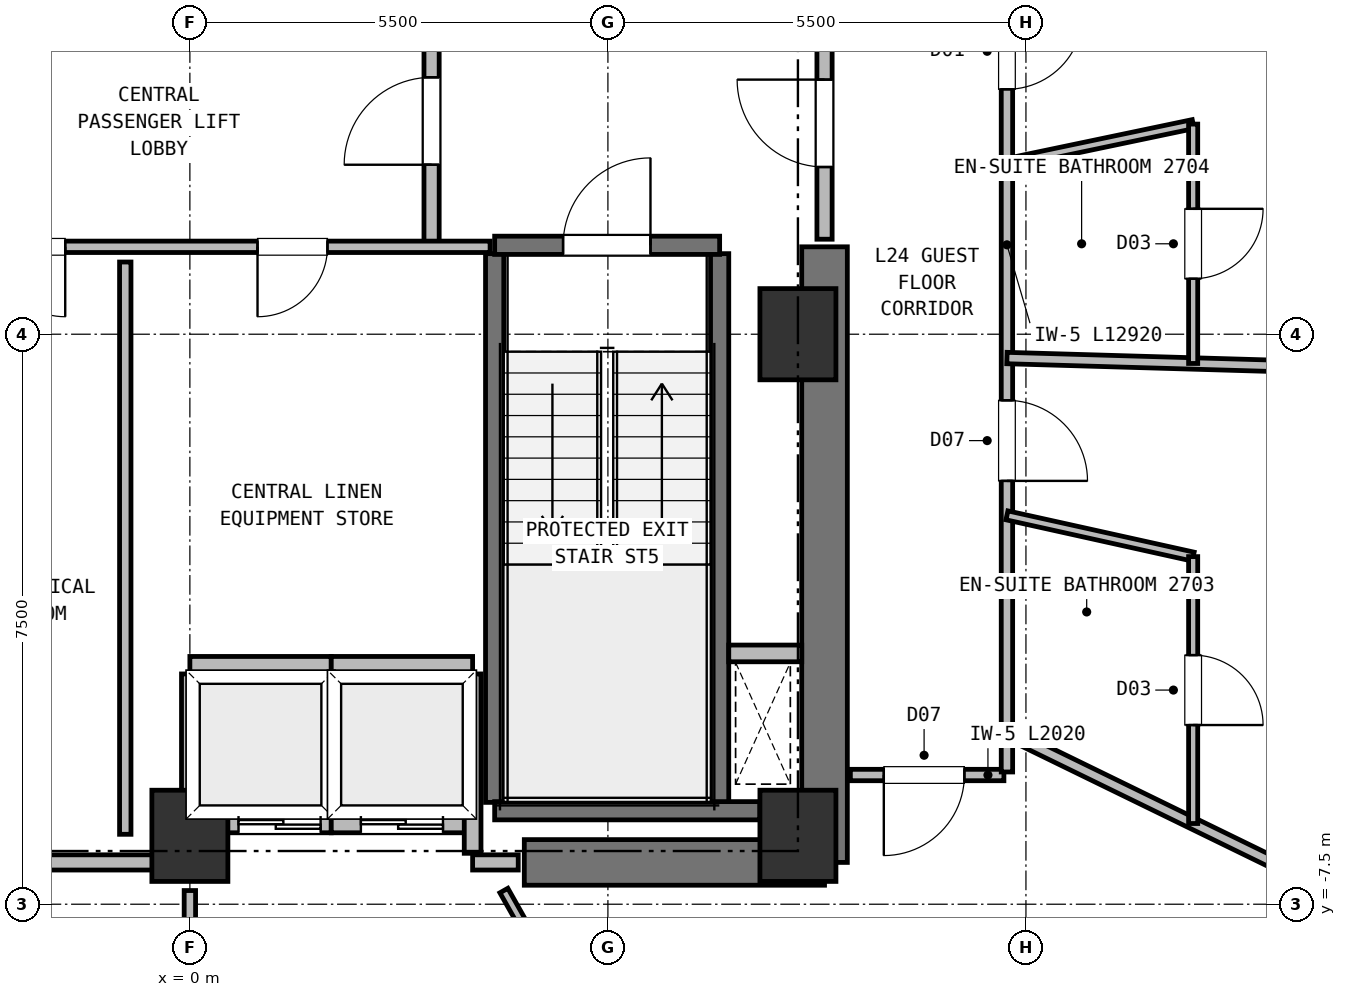
"""IFC4 building model, lengths in metres.
Left out: names, types, materials, properties, quantities, classifications, styles, units other than length and angle.
Written with IfcOpenShell. Run it as: python <this file> out.ifc"""

import sys

from ifc_helpers import new_model, si_unit, direction, frame, frame_2d, origin, origin_2d, place, context, subcontext, project, spatial, rectangle, extrude, element, fill, save


model = new_model("IFC4")
c1 = context("Model", 3, precision=1e-05, world=origin(), true_north=direction((0.0, 1.0)))
c2 = subcontext(c1, "Body", "Model", "MODEL_VIEW")
j1 = project(units=[si_unit("LENGTHUNIT", "METRE"), si_unit("PLANEANGLEUNIT", "RADIAN")], contexts=[c1])
p1 = place(None, origin())
s1 = spatial("IfcSite", under=j1, at=p1, CompositionType="ELEMENT")
p2 = place(p1, origin())
s2 = spatial("IfcBuilding", under=s1, at=p2, CompositionType="ELEMENT")
p3 = place(p2, frame((0.0, 0.0, 101.0)))
s3 = spatial("IfcBuildingStorey", under=s2, at=p3, CompositionType="ELEMENT", Elevation=101.0)
for number, where, z_axis, x_axis in (
    (1, (0.0, -6.6, 0.0), (0.0, 0.0, 1.0), (1.0, 0.0, 0.0)),
    (2, (8.0, -6.6, 0.0), (0.0, 0.0, 1.0), (1.0, 0.0, 0.0)),
    (3, (8.0, 0.0, 0.0), (0.0, 0.0, 1.0), (1.0, 0.0, 0.0)),
):
    element("IfcColumn", number, at=place(p3, frame(where, z_axis=z_axis, x_axis=x_axis)), inside=s3, PredefinedType="COLUMN", context=c2, shape_type="SweptSolid", body=[
        extrude(rectangle(XDim=1.0, YDim=1.2, at=origin_2d()), origin(), (0.0, 0.0, 1.0), 3.75),
    ])
p4 = place(p3, frame((4.4, -6.95, 0.0), z_axis=(0.0, 0.0, 1.0), x_axis=(1.0, 0.0, 0.0)))
e4 = element("IfcWall", 4, at=p4, inside=s3, PredefinedType="SHEAR", context=c2, shape_type="SweptSolid", body=[
    extrude(rectangle(XDim=3.95, YDim=0.6, at=frame_2d((1.975, 0.0))), origin(), (0.0, 0.0, 1.0), 3.5),
])
p5 = place(p3, frame((8.35, -6.95, 0.0), z_axis=(0.0, 0.0, 1.0), x_axis=(0.0, 1.0, 0.0)))
e5 = element("IfcWall", 5, at=p5, inside=s3, PredefinedType="SHEAR", context=c2, shape_type="SweptSolid", body=[
    extrude(rectangle(XDim=8.1, YDim=0.6, at=frame_2d((4.05, 0.0))), origin(), (0.0, 0.0, 1.0), 3.5),
])
p6 = place(p3, frame((14.747, -8.007, 0.0), z_axis=(0.0, 0.0, 1.0), x_axis=(0.852640164354, 0.522498564716, 0.0)))
e6 = element("IfcColumn", 6, at=p6, inside=s3, PredefinedType="COLUMN", context=c2, shape_type="SweptSolid", body=[
    extrude(rectangle(XDim=0.9, YDim=1.1, at=origin_2d()), origin(), (0.0, 0.0, 1.0), 3.75),
])
for number, where, z_axis, x_axis in (
    (7, (4.01, -6.16, 0.0), (0.0, 0.0, 1.0), (0.0, 1.0, 0.0)),
    (8, (6.97, -6.16, 0.0), (0.0, 0.0, 1.0), (0.0, 1.0, 0.0)),
):
    element("IfcWall", number, at=place(p3, frame(where, z_axis=z_axis, x_axis=x_axis)), inside=s3, PredefinedType="SHEAR", context=c2, shape_type="SweptSolid", body=[
        extrude(rectangle(XDim=7.22, YDim=0.24, at=frame_2d((3.61, 0.0))), origin(), (0.0, 0.0, 1.0), 3.5),
    ])
p7 = place(p3, frame((4.01, -6.27, 0.0), z_axis=(0.0, 0.0, 1.0), x_axis=(1.0, 0.0, 0.0)))
e9 = element("IfcWall", 9, at=p7, inside=s3, PredefinedType="SHEAR", context=c2, shape_type="SweptSolid", body=[
    extrude(rectangle(XDim=3.49, YDim=0.24, at=frame_2d((1.745, 0.0))), origin(), (0.0, 0.0, 1.0), 3.5),
])
p8 = place(p3, frame((4.01, 1.17, 0.0), z_axis=(0.0, 0.0, 1.0), x_axis=(1.0, 0.0, 0.0)))
e10 = element("IfcWall", 10, at=p8, inside=s3, PredefinedType="SHEAR", context=c2, shape_type="SweptSolid", body=[
    extrude(rectangle(XDim=2.96, YDim=0.24, at=frame_2d((1.48, 0.0))), origin(), (0.0, 0.0, 1.0), 3.5),
])
p9 = place(p8, frame((0.9, 0.0, 0.0)))
e11 = element("IfcOpeningElement", 11, at=p9, cuts=e10, PredefinedType="OPENING", context=c2, shape_type="SweptSolid", body=[
    extrude(rectangle(XDim=1.15, YDim=2.15, at=frame_2d((0.575, 1.075))), frame((0.0, 0.13, 0.0), z_axis=(0.0, -1.0, 0.0), x_axis=(1.0, 0.0, 0.0)), (0.0, 0.0, 1.0), 0.26),
])
p10 = place(p3, frame((7.09, -4.2, 0.0), z_axis=(0.0, 0.0, 1.0), x_axis=(1.0, 0.0, 0.0)))
e12 = element("IfcWall", 12, at=p10, inside=s3, PredefinedType="PARTITIONING", context=c2, shape_type="SweptSolid", body=[
    extrude(rectangle(XDim=0.96, YDim=0.22, at=frame_2d((0.48, 0.0))), origin(), (0.0, 0.0, 1.0), 3.5),
])
p11 = place(p3, frame((0.0, -6.45, 0.0), z_axis=(0.0, 0.0, 1.0), x_axis=(1.0, 0.0, 0.0)))
e13 = element("IfcWall", 13, at=p11, inside=s3, PredefinedType="PARTITIONING", context=c2, shape_type="SweptSolid", body=[
    extrude(rectangle(XDim=1.86, YDim=0.22, at=frame_2d((0.93, 0.0))), origin(), (0.0, 0.0, 1.0), 3.12),
])
p12 = place(p11, frame((0.64, 0.0, 0.0)))
e14 = element("IfcOpeningElement", 14, at=p12, cuts=e13, PredefinedType="OPENING", context=c2, shape_type="SweptSolid", body=[
    extrude(rectangle(XDim=1.08, YDim=2.15, at=frame_2d((0.54, 1.075))), frame((0.0, 0.12, 0.0), z_axis=(0.0, -1.0, 0.0), x_axis=(1.0, 0.0, 0.0)), (0.0, 0.0, 1.0), 0.24),
])
for number, where, z_axis, x_axis in (
    (15, (0.0, -4.35, 0.0), (0.0, 0.0, 1.0), (1.0, 0.0, 0.0)),
    (16, (0.0, -6.33, 0.0), (0.0, 0.0, 1.0), (0.0, 1.0, 0.0)),
    (17, (1.86, -6.33, 0.0), (0.0, 0.0, 1.0), (0.0, 1.0, 0.0)),
):
    element("IfcWall", number, at=place(p3, frame(where, z_axis=z_axis, x_axis=x_axis)), inside=s3, PredefinedType="PARTITIONING", context=c2, shape_type="SweptSolid", body=[
        extrude(rectangle(XDim=1.86, YDim=0.22, at=frame_2d((0.93, 0.0))), origin(), (0.0, 0.0, 1.0), 3.5),
    ])
p13 = place(p3, frame((1.86, -6.45, 0.0), z_axis=(0.0, 0.0, 1.0), x_axis=(1.0, 0.0, 0.0)))
e18 = element("IfcWall", 18, at=p13, inside=s3, PredefinedType="PARTITIONING", context=c2, shape_type="SweptSolid", body=[
    extrude(rectangle(XDim=1.86, YDim=0.22, at=frame_2d((0.93, 0.0))), origin(), (0.0, 0.0, 1.0), 3.12),
])
p14 = place(p13, frame((0.39, 0.0, 0.0)))
e19 = element("IfcOpeningElement", 19, at=p14, cuts=e18, PredefinedType="OPENING", context=c2, shape_type="SweptSolid", body=[
    extrude(rectangle(XDim=1.08, YDim=2.15, at=frame_2d((0.54, 1.075))), frame((0.0, 0.12, 0.0), z_axis=(0.0, -1.0, 0.0), x_axis=(1.0, 0.0, 0.0)), (0.0, 0.0, 1.0), 0.24),
])
p15 = place(p3, frame((1.86, -4.35, 0.0), z_axis=(0.0, 0.0, 1.0), x_axis=(1.0, 0.0, 0.0)))
e20 = element("IfcWall", 20, at=p15, inside=s3, PredefinedType="PARTITIONING", context=c2, shape_type="SweptSolid", body=[
    extrude(rectangle(XDim=1.86, YDim=0.22, at=frame_2d((0.93, 0.0))), origin(), (0.0, 0.0, 1.0), 3.5),
])
p16 = place(p3, frame((3.72, -6.83, 0.0), z_axis=(0.0, 0.0, 1.0), x_axis=(0.0, 1.0, 0.0)))
e21 = element("IfcWall", 21, at=p16, inside=s3, PredefinedType="PARTITIONING", context=c2, shape_type="SweptSolid", body=[
    extrude(rectangle(XDim=2.36, YDim=0.22, at=frame_2d((1.18, 0.0))), origin(), (0.0, 0.0, 1.0), 3.5),
])
p17 = place(p3, frame((3.18, 1.15, 0.0), z_axis=(0.0, 0.0, 1.0), x_axis=(0.0, 1.0, 0.0)))
e22 = element("IfcWall", 22, at=p17, inside=s3, PredefinedType="PARTITIONING", context=c2, shape_type="SweptSolid", body=[
    extrude(rectangle(XDim=3.3, YDim=0.2, at=frame_2d((1.65, 0.0))), origin(), (0.0, 0.0, 1.0), 3.5),
])
p18 = place(p17, frame((1.08, 0.0, 0.0)))
e23 = element("IfcOpeningElement", 23, at=p18, cuts=e22, PredefinedType="OPENING", context=c2, shape_type="SweptSolid", body=[
    extrude(rectangle(XDim=1.15, YDim=2.15, at=frame_2d((0.575, 1.075))), frame((0.0, 0.11, 0.0), z_axis=(0.0, -1.0, 0.0), x_axis=(1.0, 0.0, 0.0)), (0.0, 0.0, 1.0), 0.22),
])
p19 = place(p3, frame((8.35, 1.25, 0.0), z_axis=(0.0, 0.0, 1.0), x_axis=(0.0, 1.0, 0.0)))
e24 = element("IfcWall", 24, at=p19, inside=s3, PredefinedType="PARTITIONING", context=c2, shape_type="SweptSolid", body=[
    extrude(rectangle(XDim=5.3, YDim=0.2, at=frame_2d((2.65, 0.0))), origin(), (0.0, 0.0, 1.0), 3.5),
])
p20 = place(p19, frame((0.95, 0.0, 0.0)))
e25 = element("IfcOpeningElement", 25, at=p20, cuts=e24, PredefinedType="OPENING", context=c2, shape_type="SweptSolid", body=[
    extrude(rectangle(XDim=1.15, YDim=2.15, at=frame_2d((0.575, 1.075))), frame((0.0, 0.11, 0.0), z_axis=(0.0, -1.0, 0.0), x_axis=(1.0, 0.0, 0.0)), (0.0, 0.0, 1.0), 0.22),
])
p21 = place(p3, frame((3.95, 1.15, 0.0), z_axis=(0.0, 0.0, 1.0), x_axis=(-1.0, 0.0, 0.0)))
e26 = element("IfcWall", 26, at=p21, inside=s3, PredefinedType="PARTITIONING", context=c2, shape_type="SweptSolid", body=[
    extrude(rectangle(XDim=7.9, YDim=0.15, at=frame_2d((3.95, 0.0))), origin(), (0.0, 0.0, 1.0), 3.5),
])
p22 = place(p21, frame((5.59, 0.0, 0.0)))
e27 = element("IfcOpeningElement", 27, at=p22, cuts=e26, PredefinedType="OPENING", context=c2, shape_type="SweptSolid", body=[
    extrude(rectangle(XDim=0.92, YDim=2.05, at=frame_2d((0.46, 1.025))), frame((0.0, 0.085, 0.0), z_axis=(0.0, -1.0, 0.0), x_axis=(1.0, 0.0, 0.0)), (0.0, 0.0, 1.0), 0.17),
])
p23 = place(p21, frame((2.14, 0.0, 0.0)))
e28 = element("IfcOpeningElement", 28, at=p23, cuts=e26, PredefinedType="OPENING", context=c2, shape_type="SweptSolid", body=[
    extrude(rectangle(XDim=0.92, YDim=2.05, at=frame_2d((0.46, 1.025))), frame((0.0, 0.085, 0.0), z_axis=(0.0, -1.0, 0.0), x_axis=(1.0, 0.0, 0.0)), (0.0, 0.0, 1.0), 0.17),
])
p24 = place(p3, frame((-4.32, -6.95, 0.0), z_axis=(0.0, 0.0, 1.0), x_axis=(1.0, 0.0, 0.0)))
e29 = element("IfcWall", 29, at=p24, inside=s3, PredefinedType="PARTITIONING", context=c2, shape_type="SweptSolid", body=[
    extrude(rectangle(XDim=4.32, YDim=0.2, at=frame_2d((2.16, 0.0))), origin(), (0.0, 0.0, 1.0), 3.5),
])
p25 = place(p3, frame((3.72, -6.95, 0.0), z_axis=(0.0, 0.0, 1.0), x_axis=(1.0, 0.0, 0.0)))
e30 = element("IfcWall", 30, at=p25, inside=s3, PredefinedType="PARTITIONING", context=c2, shape_type="SweptSolid", body=[
    extrude(rectangle(XDim=0.6, YDim=0.2, at=frame_2d((0.3, 0.0))), origin(), (0.0, 0.0, 1.0), 3.5),
])
p26 = place(p3, frame((-0.85, -6.58, 0.0), z_axis=(0.0, 0.0, 1.0), x_axis=(0.0, 1.0, 0.0)))
e31 = element("IfcWall", 31, at=p26, inside=s3, PredefinedType="PARTITIONING", context=c2, shape_type="SweptSolid", body=[
    extrude(rectangle(XDim=7.53, YDim=0.15, at=frame_2d((3.765, 0.0))), origin(), (0.0, 0.0, 1.0), 3.5),
])
p27 = place(p3, frame((10.71, -5.8, 0.0), z_axis=(0.0, 0.0, 1.0), x_axis=(-1.0, 0.0, 0.0)))
e32 = element("IfcWall", 32, at=p27, inside=s3, PredefinedType="PARTITIONING", context=c2, shape_type="SweptSolid", body=[
    extrude(rectangle(XDim=2.02, YDim=0.15, at=frame_2d((1.01, 0.0))), origin(), (0.0, 0.0, 1.0), 3.5),
])
p28 = place(p27, frame((0.52, 0.0, 0.0)))
e33 = element("IfcOpeningElement", 33, at=p28, cuts=e32, PredefinedType="OPENING", context=c2, shape_type="SweptSolid", body=[
    extrude(rectangle(XDim=1.06, YDim=2.15, at=frame_2d((0.53, 1.075))), frame((0.0, 0.085, 0.0), z_axis=(0.0, -1.0, 0.0), x_axis=(1.0, 0.0, 0.0)), (0.0, 0.0, 1.0), 0.17),
])
p29 = place(p3, frame((10.75, 7.16, 0.0), z_axis=(0.0, 0.0, 1.0), x_axis=(0.0, -1.0, 0.0)))
e34 = element("IfcWall", 34, at=p29, inside=s3, PredefinedType="PARTITIONING", context=c2, shape_type="SweptSolid", body=[
    extrude(rectangle(XDim=12.92, YDim=0.15, at=frame_2d((6.46, 0.0))), origin(), (0.0, 0.0, 1.0), 3.5),
])
p30 = place(p29, frame((2.937, 0.0, 0.0)))
e35 = element("IfcOpeningElement", 35, at=p30, cuts=e34, PredefinedType="OPENING", context=c2, shape_type="SweptSolid", body=[
    extrude(rectangle(XDim=1.0, YDim=2.15, at=frame_2d((0.5, 1.075))), frame((0.0, 0.085, 0.0), z_axis=(0.0, -1.0, 0.0), x_axis=(1.0, 0.0, 0.0)), (0.0, 0.0, 1.0), 0.17),
])
p31 = place(p29, frame((8.03, 0.0, 0.0)))
e36 = element("IfcOpeningElement", 36, at=p31, cuts=e34, PredefinedType="OPENING", context=c2, shape_type="SweptSolid", body=[
    extrude(rectangle(XDim=1.06, YDim=2.15, at=frame_2d((0.53, 1.075))), frame((0.0, 0.085, 0.0), z_axis=(0.0, -1.0, 0.0), x_axis=(1.0, 0.0, 0.0)), (0.0, 0.0, 1.0), 0.17),
])
p32 = place(p3, frame((0.0, -7.32, 0.0), z_axis=(0.0, 0.0, 1.0), x_axis=(0.0, -1.0, 0.0)))
e37 = element("IfcWall", 37, at=p32, inside=s3, PredefinedType="PARTITIONING", context=c2, shape_type="SweptSolid", body=[
    extrude(rectangle(XDim=10.627, YDim=0.15, at=frame_2d((5.314, 0.0))), origin(), (0.0, 0.0, 1.0), 3.5),
])
p33 = place(p3, frame((4.131, -7.32, 0.0), z_axis=(0.0, 0.0, 1.0), x_axis=(0.491533175525, -0.870858850422, 0.0)))
e38 = element("IfcWall", 38, at=p33, inside=s3, PredefinedType="PARTITIONING", context=c2, shape_type="SweptSolid", body=[
    extrude(rectangle(XDim=2.733, YDim=0.12, at=frame_2d((1.366, 0.0))), origin(), (0.0, 0.0, 1.0), 3.5),
])
p34 = place(p3, frame((10.75, -5.243, 0.0), z_axis=(0.0, 0.0, 1.0), x_axis=(0.898792044872, -0.4383752503, 0.0)))
e39 = element("IfcWall", 39, at=p34, inside=s3, PredefinedType="PARTITIONING", context=c2, shape_type="SweptSolid", body=[
    extrude(rectangle(XDim=8.252, YDim=0.15, at=frame_2d((4.126, 0.0))), origin(), (0.0, 0.0, 1.0), 3.5),
])
p35 = place(p3, frame((10.75, -2.383, 0.0), z_axis=(0.0, 0.0, 1.0), x_axis=(0.976289961462, -0.216466882337, 0.0)))
e40 = element("IfcWall", 40, at=p35, inside=s3, PredefinedType="PARTITIONING", context=c2, shape_type="SweptSolid", body=[
    extrude(rectangle(XDim=2.51, YDim=0.12, at=frame_2d((1.255, 0.0))), origin(), (0.0, 0.0, 1.0), 3.5),
])
p36 = place(p3, frame((13.2, -2.927, 0.0), z_axis=(0.0, 0.0, 1.0), x_axis=(0.0, -1.0, 0.0)))
e41 = element("IfcWall", 41, at=p36, inside=s3, PredefinedType="PARTITIONING", context=c2, shape_type="SweptSolid", body=[
    extrude(rectangle(XDim=3.511, YDim=0.12, at=frame_2d((1.756, 0.0))), origin(), (0.0, 0.0, 1.0), 3.5),
])
p37 = place(p36, frame((1.296, 0.0, 0.0)))
e42 = element("IfcOpeningElement", 42, at=p37, cuts=e41, PredefinedType="OPENING", context=c2, shape_type="SweptSolid", body=[
    extrude(rectangle(XDim=0.92, YDim=2.1, at=frame_2d((0.46, 1.05))), frame((0.0, 0.07, 0.0), z_axis=(0.0, -1.0, 0.0), x_axis=(1.0, 0.0, 0.0)), (0.0, 0.0, 1.0), 0.14),
])
p38 = place(p3, frame((10.75, -0.313, 0.0), z_axis=(0.0, 0.0, 1.0), x_axis=(0.999575058165, -0.029149667157, 0.0)))
e43 = element("IfcWall", 43, at=p38, inside=s3, PredefinedType="PARTITIONING", context=c2, shape_type="SweptSolid", body=[
    extrude(rectangle(XDim=13.032, YDim=0.15, at=frame_2d((6.516, 0.0))), origin(), (0.0, 0.0, 1.0), 3.5),
])
p39 = place(p3, frame((13.2, 2.765, 0.0), z_axis=(0.0, 0.0, 1.0), x_axis=(-0.978777888037, -0.204924000276, 0.0)))
e44 = element("IfcWall", 44, at=p39, inside=s3, PredefinedType="PARTITIONING", context=c2, shape_type="SweptSolid", body=[
    extrude(rectangle(XDim=2.503, YDim=0.12, at=frame_2d((1.251, 0.0))), origin(), (0.0, 0.0, 1.0), 3.5),
])
p40 = place(p3, frame((13.2, 2.765, 0.0), z_axis=(0.0, 0.0, 1.0), x_axis=(0.0, -1.0, 0.0)))
e45 = element("IfcWall", 45, at=p40, inside=s3, PredefinedType="PARTITIONING", context=c2, shape_type="SweptSolid", body=[
    extrude(rectangle(XDim=3.15, YDim=0.12, at=frame_2d((1.575, 0.0))), origin(), (0.0, 0.0, 1.0), 3.5),
])
p41 = place(p40, frame((1.115, 0.0, 0.0)))
e46 = element("IfcOpeningElement", 46, at=p41, cuts=e45, PredefinedType="OPENING", context=c2, shape_type="SweptSolid", body=[
    extrude(rectangle(XDim=0.92, YDim=2.1, at=frame_2d((0.46, 1.05))), frame((0.0, 0.07, 0.0), z_axis=(0.0, -1.0, 0.0), x_axis=(1.0, 0.0, 0.0)), (0.0, 0.0, 1.0), 0.14),
])
p42 = place(p9, origin())
e47 = element("IfcDoor", 47, at=p42, inside=s3, OperationType="SINGLE_SWING_RIGHT", PredefinedType="DOOR", context=c2, shape_type="SweptSolid", body=[
    extrude(rectangle(XDim=1.15, YDim=2.15, at=frame_2d((0.575, 1.075))), frame((0.0, 0.025, 0.0), z_axis=(0.0, -1.0, 0.0), x_axis=(1.0, 0.0, 0.0)), (0.0, 0.0, 1.0), 0.05),
])
fill(e11, e47)
p43 = place(p12, origin())
e48 = element("IfcDoor", 48, at=p43, inside=s3, OperationType="DOUBLE_DOOR_SLIDING", PredefinedType="DOOR", context=c2, shape_type="SweptSolid", body=[
    extrude(rectangle(XDim=1.08, YDim=2.15, at=frame_2d((0.54, 1.075))), frame((0.0, 0.025, 0.0), z_axis=(0.0, -1.0, 0.0), x_axis=(1.0, 0.0, 0.0)), (0.0, 0.0, 1.0), 0.05),
])
fill(e14, e48)
p44 = place(p14, origin())
e49 = element("IfcDoor", 49, at=p44, inside=s3, OperationType="DOUBLE_DOOR_SLIDING", PredefinedType="DOOR", context=c2, shape_type="SweptSolid", body=[
    extrude(rectangle(XDim=1.08, YDim=2.15, at=frame_2d((0.54, 1.075))), frame((0.0, 0.025, 0.0), z_axis=(0.0, -1.0, 0.0), x_axis=(1.0, 0.0, 0.0)), (0.0, 0.0, 1.0), 0.05),
])
fill(e19, e49)
p45 = place(p18, origin())
e50 = element("IfcDoor", 50, at=p45, inside=s3, OperationType="SINGLE_SWING_LEFT", PredefinedType="DOOR", context=c2, shape_type="SweptSolid", body=[
    extrude(rectangle(XDim=1.15, YDim=2.15, at=frame_2d((0.575, 1.075))), frame((0.0, 0.025, 0.0), z_axis=(0.0, -1.0, 0.0), x_axis=(1.0, 0.0, 0.0)), (0.0, 0.0, 1.0), 0.05),
])
fill(e23, e50)
p46 = place(p20, origin())
e51 = element("IfcDoor", 51, at=p46, inside=s3, OperationType="SINGLE_SWING_RIGHT", PredefinedType="DOOR", context=c2, shape_type="SweptSolid", body=[
    extrude(rectangle(XDim=1.15, YDim=2.15, at=frame_2d((0.575, 1.075))), frame((0.0, 0.025, 0.0), z_axis=(0.0, -1.0, 0.0), x_axis=(1.0, 0.0, 0.0)), (0.0, 0.0, 1.0), 0.05),
])
fill(e25, e51)
p47 = place(p22, origin())
e52 = element("IfcDoor", 52, at=p47, inside=s3, OperationType="SINGLE_SWING_LEFT", PredefinedType="DOOR", context=c2, shape_type="SweptSolid", body=[
    extrude(rectangle(XDim=0.92, YDim=2.05, at=frame_2d((0.46, 1.025))), frame((0.0, 0.025, 0.0), z_axis=(0.0, -1.0, 0.0), x_axis=(1.0, 0.0, 0.0)), (0.0, 0.0, 1.0), 0.05),
])
fill(e27, e52)
p48 = place(p23, origin())
e53 = element("IfcDoor", 53, at=p48, inside=s3, OperationType="SINGLE_SWING_RIGHT", PredefinedType="DOOR", context=c2, shape_type="SweptSolid", body=[
    extrude(rectangle(XDim=0.92, YDim=2.05, at=frame_2d((0.46, 1.025))), frame((0.0, 0.025, 0.0), z_axis=(0.0, -1.0, 0.0), x_axis=(1.0, 0.0, 0.0)), (0.0, 0.0, 1.0), 0.05),
])
fill(e28, e53)
p49 = place(p37, origin())
e54 = element("IfcDoor", 54, at=p49, inside=s3, OperationType="SINGLE_SWING_RIGHT", PredefinedType="DOOR", context=c2, shape_type="SweptSolid", body=[
    extrude(rectangle(XDim=0.92, YDim=2.1, at=frame_2d((0.46, 1.05))), frame((0.0, 0.025, 0.0), z_axis=(0.0, -1.0, 0.0), x_axis=(1.0, 0.0, 0.0)), (0.0, 0.0, 1.0), 0.05),
])
fill(e42, e54)
p50 = place(p41, origin())
e55 = element("IfcDoor", 55, at=p50, inside=s3, OperationType="SINGLE_SWING_LEFT", PredefinedType="DOOR", context=c2, shape_type="SweptSolid", body=[
    extrude(rectangle(XDim=0.92, YDim=2.1, at=frame_2d((0.46, 1.05))), frame((0.0, 0.025, 0.0), z_axis=(0.0, -1.0, 0.0), x_axis=(1.0, 0.0, 0.0)), (0.0, 0.0, 1.0), 0.05),
])
fill(e46, e55)
p51 = place(p30, origin())
e56 = element("IfcDoor", 56, at=p51, inside=s3, OperationType="SINGLE_SWING_LEFT", PredefinedType="DOOR", context=c2, shape_type="SweptSolid", body=[
    extrude(rectangle(XDim=1.0, YDim=2.15, at=frame_2d((0.5, 1.075))), frame((0.0, 0.025, 0.0), z_axis=(0.0, -1.0, 0.0), x_axis=(1.0, 0.0, 0.0)), (0.0, 0.0, 1.0), 0.05),
])
fill(e35, e56)
p52 = place(p31, origin())
e57 = element("IfcDoor", 57, at=p52, inside=s3, OperationType="SINGLE_SWING_RIGHT", PredefinedType="DOOR", context=c2, shape_type="SweptSolid", body=[
    extrude(rectangle(XDim=1.06, YDim=2.15, at=frame_2d((0.53, 1.075))), frame((0.0, 0.025, 0.0), z_axis=(0.0, -1.0, 0.0), x_axis=(1.0, 0.0, 0.0)), (0.0, 0.0, 1.0), 0.05),
])
fill(e36, e57)
p53 = place(p28, origin())
e58 = element("IfcDoor", 58, at=p53, inside=s3, OperationType="SINGLE_SWING_RIGHT", PredefinedType="DOOR", context=c2, shape_type="SweptSolid", body=[
    extrude(rectangle(XDim=1.06, YDim=2.15, at=frame_2d((0.53, 1.075))), frame((0.0, 0.025, 0.0), z_axis=(0.0, -1.0, 0.0), x_axis=(1.0, 0.0, 0.0)), (0.0, 0.0, 1.0), 0.05),
])
fill(e33, e58)
save(model, sys.argv[1])
